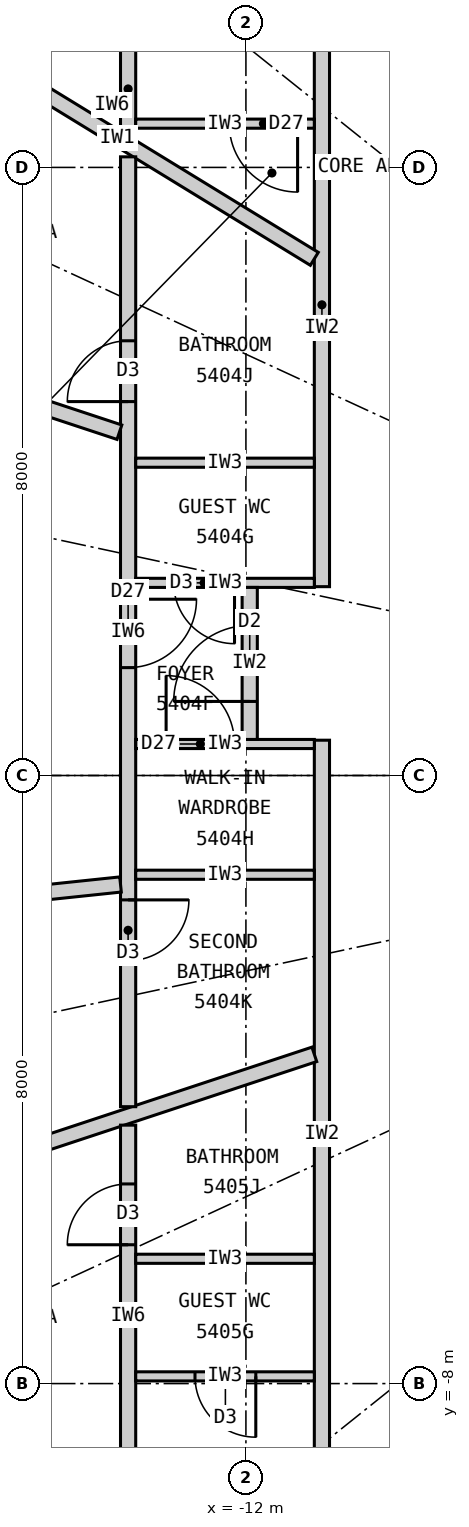
"""IFC4 building model, lengths in metres.
Left out: names, types, materials, properties, quantities, classifications, styles, units other than length and angle.
Written with IfcOpenShell. Run it as: python <this file> out.ifc"""

import sys

from ifc_helpers import new_model, si_unit, direction, frame, frame_2d, origin, place, context, subcontext, project, spatial, rectangle, extrude, element, fill, save


model = new_model("IFC4")
c1 = context("Model", 3, precision=1e-05, world=origin(), true_north=direction((0.0, 1.0)))
c2 = subcontext(c1, "Body", "Model", "MODEL_VIEW")
j1 = project(units=[si_unit("LENGTHUNIT", "METRE"), si_unit("PLANEANGLEUNIT", "RADIAN")], contexts=[c1])
p1 = place(None, origin())
s1 = spatial("IfcSite", under=j1, at=p1, CompositionType="ELEMENT")
p2 = place(p1, origin())
s2 = spatial("IfcBuilding", under=s1, at=p2, CompositionType="ELEMENT")
p3 = place(p2, frame((0.0, 0.0, 202.8)))
s3 = spatial("IfcBuildingStorey", under=s2, at=p3, CompositionType="ELEMENT", Elevation=202.8)
p4 = place(p3, frame((-11.0, 9.9, 0.0), z_axis=(0.0, 0.0, 1.0), x_axis=(0.0, -1.0, 0.0)))
e1 = element("IfcWall", 1, at=p4, inside=s3, PredefinedType="PARTITIONING", context=c2, shape_type="SweptSolid", body=[
    extrude(rectangle(XDim=7.416, YDim=0.2, at=frame_2d((3.708, 0.0))), origin(), (0.0, 0.0, 1.0), 3.12),
])
p5 = place(p3, frame((-11.0, 0.464, 0.0), z_axis=(0.0, 0.0, 1.0), x_axis=(0.0, -1.0, 0.0)))
e2 = element("IfcWall", 2, at=p5, inside=s3, PredefinedType="PARTITIONING", context=c2, shape_type="SweptSolid", body=[
    extrude(rectangle(XDim=10.364, YDim=0.2, at=frame_2d((5.182, 0.0))), origin(), (0.0, 0.0, 1.0), 3.12),
])
p6 = place(p3, frame((-11.1, 6.797, 0.0), z_axis=(0.0, 0.0, 1.0), x_axis=(-0.852799818179, 0.522237943963, 0.0)))
e3 = element("IfcWall", 3, at=p6, inside=s3, PredefinedType="PARTITIONING", context=c2, shape_type="SweptSolid", body=[
    extrude(rectangle(XDim=6.077, YDim=0.2, at=frame_2d((3.039, 0.0))), origin(), (0.0, 0.0, 1.0), 3.12),
])
p7 = place(p3, frame((-11.1, -3.669, 0.0), z_axis=(0.0, 0.0, 1.0), x_axis=(-0.949476668397, -0.313837627079, 0.0)))
e4 = element("IfcWall", 4, at=p7, inside=s3, PredefinedType="PARTITIONING", context=c2, shape_type="SweptSolid", body=[
    extrude(rectangle(XDim=8.339, YDim=0.2, at=frame_2d((4.169, 0.0))), origin(), (0.0, 0.0, 1.0), 3.12),
])
p8 = place(p3, frame((-13.55, 9.609, 0.0), z_axis=(0.0, 0.0, 1.0), x_axis=(0.0, -1.0, 0.0)))
e5 = element("IfcWall", 5, at=p8, inside=s3, PredefinedType="PARTITIONING", context=c2, shape_type="SweptSolid", body=[
    extrude(rectangle(XDim=1.153, YDim=0.2, at=frame_2d((0.576, 0.0))), origin(), (0.0, 0.0, 1.0), 3.12),
])
p9 = place(p3, frame((-11.1, 8.576, 0.0), z_axis=(0.0, 0.0, 1.0), x_axis=(-1.0, 0.0, 0.0)))
e6 = element("IfcWall", 6, at=p9, inside=s3, PredefinedType="PARTITIONING", context=c2, shape_type="SweptSolid", body=[
    extrude(rectangle(XDim=2.35, YDim=0.12, at=frame_2d((1.175, 0.0))), origin(), (0.0, 0.0, 1.0), 3.12),
])
p10 = place(p9, frame((0.22, 0.0, 0.0)))
e7 = element("IfcOpeningElement", 7, at=p10, cuts=e6, PredefinedType="OPENING", context=c2, shape_type="SweptSolid", body=[
    extrude(rectangle(XDim=0.9, YDim=2.1, at=frame_2d((0.45, 1.05))), frame((0.0, 0.07, 0.0), z_axis=(0.0, -1.0, 0.0), x_axis=(1.0, 0.0, 0.0)), (0.0, 0.0, 1.0), 0.14),
])
p11 = place(p3, frame((-13.55, 8.139, 0.0), z_axis=(0.0, 0.0, 1.0), x_axis=(0.0, -1.0, 0.0)))
e8 = element("IfcWall", 8, at=p11, inside=s3, PredefinedType="PARTITIONING", context=c2, shape_type="SweptSolid", body=[
    extrude(rectangle(XDim=12.496, YDim=0.2, at=frame_2d((6.248, 0.0))), origin(), (0.0, 0.0, 1.0), 3.12),
])
p12 = place(p11, frame((2.42, 0.0, 0.0)))
e9 = element("IfcOpeningElement", 9, at=p12, cuts=e8, PredefinedType="OPENING", context=c2, shape_type="SweptSolid", body=[
    extrude(rectangle(XDim=0.8, YDim=2.1, at=frame_2d((0.4, 1.05))), frame((0.0, 0.11, 0.0), z_axis=(0.0, -1.0, 0.0), x_axis=(1.0, 0.0, 0.0)), (0.0, 0.0, 1.0), 0.22),
])
p13 = place(p11, frame((9.776, 0.0, 0.0)))
e10 = element("IfcOpeningElement", 10, at=p13, cuts=e8, PredefinedType="OPENING", context=c2, shape_type="SweptSolid", body=[
    extrude(rectangle(XDim=0.8, YDim=2.1, at=frame_2d((0.4, 1.05))), frame((0.0, 0.11, 0.0), z_axis=(0.0, -1.0, 0.0), x_axis=(1.0, 0.0, 0.0)), (0.0, 0.0, 1.0), 0.22),
])
p14 = place(p11, frame((5.82, 0.0, 0.0)))
e11 = element("IfcOpeningElement", 11, at=p14, cuts=e8, PredefinedType="OPENING", context=c2, shape_type="SweptSolid", body=[
    extrude(rectangle(XDim=0.9, YDim=2.1, at=frame_2d((0.45, 1.05))), frame((0.0, 0.11, 0.0), z_axis=(0.0, -1.0, 0.0), x_axis=(1.0, 0.0, 0.0)), (0.0, 0.0, 1.0), 0.22),
])
p15 = place(p3, frame((-13.664, 4.516, 0.0), z_axis=(0.0, 0.0, 1.0), x_axis=(-0.949481375941, 0.313823384632, 0.0)))
e12 = element("IfcWall", 12, at=p15, inside=s3, PredefinedType="PARTITIONING", context=c2, shape_type="SweptSolid", body=[
    extrude(rectangle(XDim=5.638, YDim=0.2, at=frame_2d((2.819, 0.0))), origin(), (0.0, 0.0, 1.0), 3.12),
])
p16 = place(p15, frame((1.82, 0.0, 0.0)))
e13 = element("IfcOpeningElement", 13, at=p16, cuts=e12, PredefinedType="OPENING", context=c2, shape_type="SweptSolid", body=[
    extrude(rectangle(XDim=0.9, YDim=2.1, at=frame_2d((0.45, 1.05))), frame((0.0, 0.11, 0.0), z_axis=(0.0, -1.0, 0.0), x_axis=(1.0, 0.0, 0.0)), (0.0, 0.0, 1.0), 0.22),
])
p17 = place(p3, frame((-13.65, -1.434, 0.0), z_axis=(0.0, 0.0, 1.0), x_axis=(-0.994526954268, -0.10448031984, 0.0)))
e14 = element("IfcWall", 14, at=p17, inside=s3, PredefinedType="PARTITIONING", context=c2, shape_type="SweptSolid", body=[
    extrude(rectangle(XDim=6.837, YDim=0.2, at=frame_2d((3.418, 0.0))), origin(), (0.0, 0.0, 1.0), 2.47),
])
p18 = place(p17, frame((2.27, 0.0, 0.0)))
e15 = element("IfcOpeningElement", 15, at=p18, cuts=e14, PredefinedType="OPENING", context=c2, shape_type="SweptSolid", body=[
    extrude(rectangle(XDim=0.9, YDim=2.1, at=frame_2d((0.45, 1.05))), frame((0.0, 0.11, 0.0), z_axis=(0.0, -1.0, 0.0), x_axis=(1.0, 0.0, 0.0)), (0.0, 0.0, 1.0), 0.22),
])
p19 = place(p3, frame((-11.1, 4.115, 0.0), z_axis=(0.0, 0.0, 1.0), x_axis=(-1.0, 0.0, 0.0)))
e16 = element("IfcWall", 16, at=p19, inside=s3, PredefinedType="PARTITIONING", context=c2, shape_type="SweptSolid", body=[
    extrude(rectangle(XDim=2.35, YDim=0.12, at=frame_2d((1.175, 0.0))), origin(), (0.0, 0.0, 1.0), 3.12),
])
p20 = place(p3, frame((-11.1, 2.534, 0.0), z_axis=(0.0, 0.0, 1.0), x_axis=(-1.0, 0.0, 0.0)))
e17 = element("IfcWall", 17, at=p20, inside=s3, PredefinedType="PARTITIONING", context=c2, shape_type="SweptSolid", body=[
    extrude(rectangle(XDim=2.35, YDim=0.12, at=frame_2d((1.175, 0.0))), origin(), (0.0, 0.0, 1.0), 3.12),
])
p21 = place(p20, frame((1.05, 0.0, 0.0)))
e18 = element("IfcOpeningElement", 18, at=p21, cuts=e17, PredefinedType="OPENING", context=c2, shape_type="SweptSolid", body=[
    extrude(rectangle(XDim=0.8, YDim=2.1, at=frame_2d((0.4, 1.05))), frame((0.0, 0.07, 0.0), z_axis=(0.0, -1.0, 0.0), x_axis=(1.0, 0.0, 0.0)), (0.0, 0.0, 1.0), 0.14),
])
p22 = place(p3, frame((-11.1, 0.414, 0.0), z_axis=(0.0, 0.0, 1.0), x_axis=(-1.0, 0.0, 0.0)))
e19 = element("IfcWall", 19, at=p22, inside=s3, PredefinedType="PARTITIONING", context=c2, shape_type="SweptSolid", body=[
    extrude(rectangle(XDim=2.35, YDim=0.12, at=frame_2d((1.175, 0.0))), origin(), (0.0, 0.0, 1.0), 3.12),
])
p23 = place(p22, frame((1.05, 0.0, 0.0)))
e20 = element("IfcOpeningElement", 20, at=p23, cuts=e19, PredefinedType="OPENING", context=c2, shape_type="SweptSolid", body=[
    extrude(rectangle(XDim=0.9, YDim=2.1, at=frame_2d((0.45, 1.05))), frame((0.0, 0.07, 0.0), z_axis=(0.0, -1.0, 0.0), x_axis=(1.0, 0.0, 0.0)), (0.0, 0.0, 1.0), 0.14),
])
p24 = place(p3, frame((-11.1, -1.306, 0.0), z_axis=(0.0, 0.0, 1.0), x_axis=(-1.0, 0.0, 0.0)))
e21 = element("IfcWall", 21, at=p24, inside=s3, PredefinedType="PARTITIONING", context=c2, shape_type="SweptSolid", body=[
    extrude(rectangle(XDim=2.35, YDim=0.12, at=frame_2d((1.175, 0.0))), origin(), (0.0, 0.0, 1.0), 3.12),
])
p25 = place(p3, frame((-11.95, 2.474, 0.0), z_axis=(0.0, 0.0, 1.0), x_axis=(0.0, -1.0, 0.0)))
e22 = element("IfcWall", 22, at=p25, inside=s3, PredefinedType="PARTITIONING", context=c2, shape_type="SweptSolid", body=[
    extrude(rectangle(XDim=2.0, YDim=0.2, at=frame_2d((1.0, 0.0))), origin(), (0.0, 0.0, 1.0), 3.12),
])
p26 = place(p25, frame((0.5, 0.0, 0.0)))
e23 = element("IfcOpeningElement", 23, at=p26, cuts=e22, PredefinedType="OPENING", context=c2, shape_type="SweptSolid", body=[
    extrude(rectangle(XDim=1.0, YDim=2.2, at=frame_2d((0.5, 1.1))), frame((0.0, 0.11, 0.0), z_axis=(0.0, -1.0, 0.0), x_axis=(1.0, 0.0, 0.0)), (0.0, 0.0, 1.0), 0.22),
])
p27 = place(p3, frame((-13.55, -4.6, 0.0), z_axis=(0.0, 0.0, 1.0), x_axis=(0.0, -1.0, 0.0)))
e24 = element("IfcWall", 24, at=p27, inside=s3, PredefinedType="PARTITIONING", context=c2, shape_type="SweptSolid", body=[
    extrude(rectangle(XDim=5.009, YDim=0.2, at=frame_2d((2.504, 0.0))), origin(), (0.0, 0.0, 1.0), 3.12),
])
p28 = place(p27, frame((0.774, 0.0, 0.0)))
e25 = element("IfcOpeningElement", 25, at=p28, cuts=e24, PredefinedType="OPENING", context=c2, shape_type="SweptSolid", body=[
    extrude(rectangle(XDim=0.8, YDim=2.1, at=frame_2d((0.4, 1.05))), frame((0.0, 0.11, 0.0), z_axis=(0.0, -1.0, 0.0), x_axis=(1.0, 0.0, 0.0)), (0.0, 0.0, 1.0), 0.22),
])
p29 = place(p3, frame((-11.1, -6.358, 0.0), z_axis=(0.0, 0.0, 1.0), x_axis=(-1.0, 0.0, 0.0)))
e26 = element("IfcWall", 26, at=p29, inside=s3, PredefinedType="PARTITIONING", context=c2, shape_type="SweptSolid", body=[
    extrude(rectangle(XDim=2.35, YDim=0.12, at=frame_2d((1.175, 0.0))), origin(), (0.0, 0.0, 1.0), 3.12),
])
p30 = place(p3, frame((-11.1, -7.905, 0.0), z_axis=(0.0, 0.0, 1.0), x_axis=(-1.0, 0.0, 0.0)))
e27 = element("IfcWall", 27, at=p30, inside=s3, PredefinedType="PARTITIONING", context=c2, shape_type="SweptSolid", body=[
    extrude(rectangle(XDim=2.35, YDim=0.12, at=frame_2d((1.175, 0.0))), origin(), (0.0, 0.0, 1.0), 3.12),
])
p31 = place(p30, frame((0.77, 0.0, 0.0)))
e28 = element("IfcOpeningElement", 28, at=p31, cuts=e27, PredefinedType="OPENING", context=c2, shape_type="SweptSolid", body=[
    extrude(rectangle(XDim=0.8, YDim=2.1, at=frame_2d((0.4, 1.05))), frame((0.0, 0.07, 0.0), z_axis=(0.0, -1.0, 0.0), x_axis=(1.0, 0.0, 0.0)), (0.0, 0.0, 1.0), 0.14),
])
p32 = place(p10, origin())
e29 = element("IfcDoor", 29, at=p32, inside=s3, OperationType="SINGLE_SWING_LEFT", PredefinedType="DOOR", context=c2, shape_type="SweptSolid", body=[
    extrude(rectangle(XDim=0.9, YDim=2.1, at=frame_2d((0.45, 1.05))), frame((0.0, 0.025, 0.0), z_axis=(0.0, -1.0, 0.0), x_axis=(1.0, 0.0, 0.0)), (0.0, 0.0, 1.0), 0.05),
])
fill(e7, e29)
p33 = place(p26, origin())
e30 = element("IfcDoor", 30, at=p33, inside=s3, OperationType="SINGLE_SWING_RIGHT", PredefinedType="DOOR", context=c2, shape_type="SweptSolid", body=[
    extrude(rectangle(XDim=1.0, YDim=2.2, at=frame_2d((0.5, 1.1))), frame((0.0, 0.025, 0.0), z_axis=(0.0, -1.0, 0.0), x_axis=(1.0, 0.0, 0.0)), (0.0, 0.0, 1.0), 0.05),
])
fill(e23, e30)
p34 = place(p12, origin())
e31 = element("IfcDoor", 31, at=p34, inside=s3, OperationType="SINGLE_SWING_RIGHT", PredefinedType="DOOR", context=c2, shape_type="SweptSolid", body=[
    extrude(rectangle(XDim=0.8, YDim=2.1, at=frame_2d((0.4, 1.05))), frame((0.0, 0.025, 0.0), z_axis=(0.0, -1.0, 0.0), x_axis=(1.0, 0.0, 0.0)), (0.0, 0.0, 1.0), 0.05),
])
fill(e9, e31)
p35 = place(p21, origin())
e32 = element("IfcDoor", 32, at=p35, inside=s3, OperationType="SINGLE_SWING_LEFT", PredefinedType="DOOR", context=c2, shape_type="SweptSolid", body=[
    extrude(rectangle(XDim=0.8, YDim=2.1, at=frame_2d((0.4, 1.05))), frame((0.0, 0.025, 0.0), z_axis=(0.0, -1.0, 0.0), x_axis=(1.0, 0.0, 0.0)), (0.0, 0.0, 1.0), 0.05),
])
fill(e18, e32)
p36 = place(p23, origin())
e33 = element("IfcDoor", 33, at=p36, inside=s3, OperationType="SINGLE_SWING_RIGHT", PredefinedType="DOOR", context=c2, shape_type="SweptSolid", body=[
    extrude(rectangle(XDim=0.9, YDim=2.1, at=frame_2d((0.45, 1.05))), frame((0.0, 0.025, 0.0), z_axis=(0.0, -1.0, 0.0), x_axis=(1.0, 0.0, 0.0)), (0.0, 0.0, 1.0), 0.05),
])
fill(e20, e33)
p37 = place(p13, origin())
e34 = element("IfcDoor", 34, at=p37, inside=s3, OperationType="SINGLE_SWING_LEFT", PredefinedType="DOOR", context=c2, shape_type="SweptSolid", body=[
    extrude(rectangle(XDim=0.8, YDim=2.1, at=frame_2d((0.4, 1.05))), frame((0.0, 0.025, 0.0), z_axis=(0.0, -1.0, 0.0), x_axis=(1.0, 0.0, 0.0)), (0.0, 0.0, 1.0), 0.05),
])
fill(e10, e34)
p38 = place(p14, origin())
e35 = element("IfcDoor", 35, at=p38, inside=s3, OperationType="SINGLE_SWING_LEFT", PredefinedType="DOOR", context=c2, shape_type="SweptSolid", body=[
    extrude(rectangle(XDim=0.9, YDim=2.1, at=frame_2d((0.45, 1.05))), frame((0.0, 0.025, 0.0), z_axis=(0.0, -1.0, 0.0), x_axis=(1.0, 0.0, 0.0)), (0.0, 0.0, 1.0), 0.05),
])
fill(e11, e35)
p39 = place(p28, origin())
e36 = element("IfcDoor", 36, at=p39, inside=s3, OperationType="SINGLE_SWING_RIGHT", PredefinedType="DOOR", context=c2, shape_type="SweptSolid", body=[
    extrude(rectangle(XDim=0.8, YDim=2.1, at=frame_2d((0.4, 1.05))), frame((0.0, 0.025, 0.0), z_axis=(0.0, -1.0, 0.0), x_axis=(1.0, 0.0, 0.0)), (0.0, 0.0, 1.0), 0.05),
])
fill(e25, e36)
p40 = place(p31, origin())
e37 = element("IfcDoor", 37, at=p40, inside=s3, OperationType="SINGLE_SWING_LEFT", PredefinedType="DOOR", context=c2, shape_type="SweptSolid", body=[
    extrude(rectangle(XDim=0.8, YDim=2.1, at=frame_2d((0.4, 1.05))), frame((0.0, 0.025, 0.0), z_axis=(0.0, -1.0, 0.0), x_axis=(1.0, 0.0, 0.0)), (0.0, 0.0, 1.0), 0.05),
])
fill(e28, e37)
save(model, sys.argv[1])
